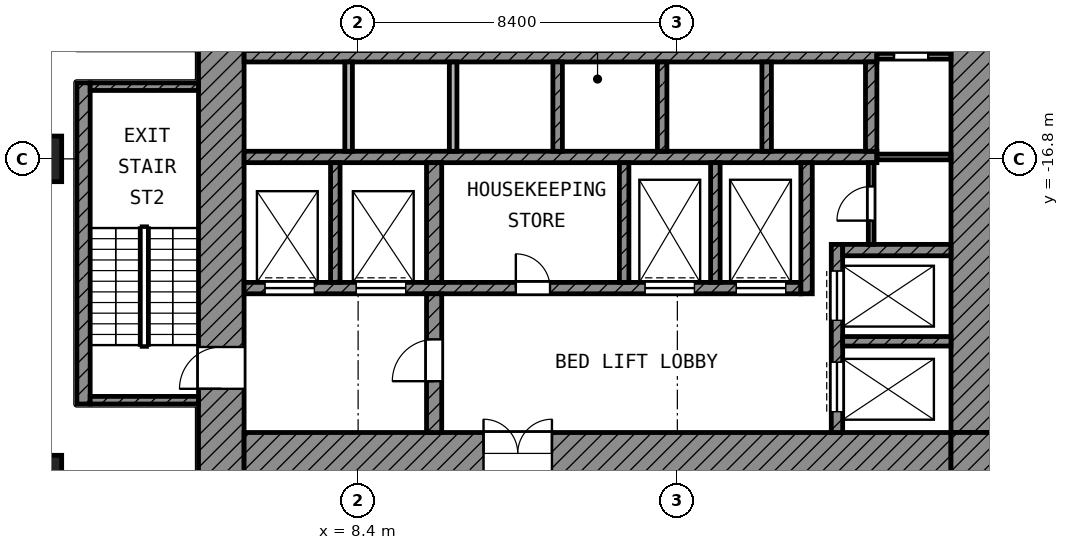
"""IFC4 building model, lengths in metres.
Left out: names, types, materials, properties, quantities, classifications, styles, units other than length and angle.
Written with IfcOpenShell. Run it as: python <this file> out.ifc"""

import sys

from ifc_helpers import new_model, si_unit, direction, frame, frame_2d, origin, origin_2d, place, context, subcontext, project, spatial, rectangle, extrude, element, fill, save


model = new_model("IFC4")
c1 = context("Model", 3, precision=1e-05, world=origin(), true_north=direction((0.0, 1.0)))
c2 = subcontext(c1, "Body", "Model", "MODEL_VIEW")
j1 = project(units=[si_unit("LENGTHUNIT", "METRE"), si_unit("PLANEANGLEUNIT", "RADIAN")], contexts=[c1])
p1 = place(None, origin())
s1 = spatial("IfcSite", under=j1, at=p1, CompositionType="ELEMENT")
p2 = place(p1, origin())
s2 = spatial("IfcBuilding", under=s1, at=p2, CompositionType="ELEMENT")
p3 = place(p2, frame((0.0, 0.0, 56.0)))
s3 = spatial("IfcBuildingStorey", under=s2, at=p3, CompositionType="ELEMENT", Elevation=56.0)
for number, where, z_axis, x_axis in (
    (1, (0.0, -16.8, 0.0), (0.0, 0.0, 1.0), (1.0, 0.0, 0.0)),
    (2, (0.0, -25.2, 0.0), (0.0, 0.0, 1.0), (1.0, 0.0, 0.0)),
):
    element("IfcColumn", number, at=place(p3, frame(where, z_axis=z_axis, x_axis=x_axis)), inside=s3, PredefinedType="COLUMN", context=c2, shape_type="SweptSolid", body=[
        extrude(rectangle(XDim=1.2, YDim=1.2, at=origin_2d()), origin(), (0.0, 0.0, 1.0), 4.2),
    ])
p4 = place(p3, frame((4.8, -25.1, 0.0), z_axis=(0.0, 0.0, 1.0), x_axis=(0.0, 1.0, 0.0)))
e3 = element("IfcWall", 3, at=p4, inside=s3, PredefinedType="SHEAR", context=c2, shape_type="SweptSolid", body=[
    extrude(rectangle(XDim=19.7, YDim=1.2, at=frame_2d((9.85, 0.0))), origin(), (0.0, 0.0, 1.0), 3.9),
])
p5 = place(p4, frame((11.55, 0.0, 0.0)))
e4 = element("IfcOpeningElement", 4, at=p5, cuts=e3, PredefinedType="OPENING", context=c2, shape_type="SweptSolid", body=[
    extrude(rectangle(XDim=1.1, YDim=2.1, at=frame_2d((0.55, 1.05))), frame((0.0, 0.61, 0.0), z_axis=(0.0, -1.0, 0.0), x_axis=(1.0, 0.0, 0.0)), (0.0, 0.0, 1.0), 1.22),
])
p6 = place(p4, frame((2.25, 0.0, 0.0)))
e5 = element("IfcOpeningElement", 5, at=p6, cuts=e3, PredefinedType="OPENING", context=c2, shape_type="SweptSolid", body=[
    extrude(rectangle(XDim=1.1, YDim=2.1, at=frame_2d((0.55, 1.05))), frame((0.0, 0.61, 0.0), z_axis=(0.0, -1.0, 0.0), x_axis=(1.0, 0.0, 0.0)), (0.0, 0.0, 1.0), 1.22),
])
p7 = place(p3, frame((24.55, -24.0, 0.0), z_axis=(0.0, 0.0, 1.0), x_axis=(0.0, 1.0, 0.0)))
e6 = element("IfcWall", 6, at=p7, inside=s3, PredefinedType="SHEAR", context=c2, shape_type="SweptSolid", body=[
    extrude(rectangle(XDim=18.6, YDim=1.1, at=frame_2d((9.3, 0.0))), origin(), (0.0, 0.0, 1.0), 3.9),
])
p8 = place(p7, frame((10.5, 0.0, 0.0)))
e7 = element("IfcOpeningElement", 7, at=p8, cuts=e6, PredefinedType="OPENING", context=c2, shape_type="SweptSolid", body=[
    extrude(rectangle(XDim=1.8, YDim=2.1, at=frame_2d((0.9, 1.05))), frame((0.0, 0.56, 0.0), z_axis=(0.0, -1.0, 0.0), x_axis=(1.0, 0.0, 0.0)), (0.0, 0.0, 1.0), 1.12),
])
p9 = place(p3, frame((5.4, -24.55, 0.0), z_axis=(0.0, 0.0, 1.0), x_axis=(1.0, 0.0, 0.0)))
e8 = element("IfcWall", 8, at=p9, inside=s3, PredefinedType="SHEAR", context=c2, shape_type="SweptSolid", body=[
    extrude(rectangle(XDim=18.6, YDim=1.1, at=frame_2d((9.3, 0.0))), origin(), (0.0, 0.0, 1.0), 3.9),
])
p10 = place(p9, frame((6.3, 0.0, 0.0)))
e9 = element("IfcOpeningElement", 9, at=p10, cuts=e8, PredefinedType="OPENING", context=c2, shape_type="SweptSolid", body=[
    extrude(rectangle(XDim=1.8, YDim=2.1, at=frame_2d((0.9, 1.05))), frame((0.0, 0.56, 0.0), z_axis=(0.0, -1.0, 0.0), x_axis=(1.0, 0.0, 0.0)), (0.0, 0.0, 1.0), 1.12),
])
p11 = place(p3, frame((24.55, -25.1, 0.0), z_axis=(0.0, 0.0, 1.0), x_axis=(0.0, 1.0, 0.0)))
e10 = element("IfcWall", 10, at=p11, inside=s3, PredefinedType="SHEAR", context=c2, shape_type="SweptSolid", body=[
    extrude(rectangle(XDim=1.1, YDim=1.1, at=frame_2d((0.55, 0.0))), origin(), (0.0, 0.0, 1.0), 3.9),
])
for number, where, z_axis, x_axis in (
    (11, (5.4, -14.1, 0.0), (0.0, 0.0, 1.0), (1.0, 0.0, 0.0)),
    (12, (5.4, -16.75, 0.0), (0.0, 0.0, 1.0), (1.0, 0.0, 0.0)),
):
    element("IfcWall", number, at=place(p3, frame(where, z_axis=z_axis, x_axis=x_axis)), inside=s3, PredefinedType="SHEAR", context=c2, shape_type="SweptSolid", body=[
        extrude(rectangle(XDim=16.65, YDim=0.3, at=frame_2d((8.325, 0.0))), origin(), (0.0, 0.0, 1.0), 3.9),
    ])
p12 = place(p3, frame((5.4, -20.2, 0.0), z_axis=(0.0, 0.0, 1.0), x_axis=(1.0, 0.0, 0.0)))
e13 = element("IfcWall", 13, at=p12, inside=s3, PredefinedType="SHEAR", context=c2, shape_type="SweptSolid", body=[
    extrude(rectangle(XDim=14.65, YDim=0.3, at=frame_2d((7.325, 0.0))), origin(), (0.0, 0.0, 1.0), 3.9),
])
p13 = place(p12, frame((10.55, 0.0, 0.0)))
e14 = element("IfcOpeningElement", 14, at=p13, cuts=e13, PredefinedType="OPENING", context=c2, shape_type="SweptSolid", body=[
    extrude(rectangle(XDim=1.3, YDim=2.1, at=frame_2d((0.65, 1.05))), frame((0.0, 0.16, 0.0), z_axis=(0.0, -1.0, 0.0), x_axis=(1.0, 0.0, 0.0)), (0.0, 0.0, 1.0), 0.32),
])
p14 = place(p12, frame((12.95, 0.0, 0.0)))
e15 = element("IfcOpeningElement", 15, at=p14, cuts=e13, PredefinedType="OPENING", context=c2, shape_type="SweptSolid", body=[
    extrude(rectangle(XDim=1.3, YDim=2.1, at=frame_2d((0.65, 1.05))), frame((0.0, 0.16, 0.0), z_axis=(0.0, -1.0, 0.0), x_axis=(1.0, 0.0, 0.0)), (0.0, 0.0, 1.0), 0.32),
])
p15 = place(p12, frame((0.55, 0.0, 0.0)))
e16 = element("IfcOpeningElement", 16, at=p15, cuts=e13, PredefinedType="OPENING", context=c2, shape_type="SweptSolid", body=[
    extrude(rectangle(XDim=1.3, YDim=2.1, at=frame_2d((0.65, 1.05))), frame((0.0, 0.16, 0.0), z_axis=(0.0, -1.0, 0.0), x_axis=(1.0, 0.0, 0.0)), (0.0, 0.0, 1.0), 0.32),
])
p16 = place(p12, frame((2.95, 0.0, 0.0)))
e17 = element("IfcOpeningElement", 17, at=p16, cuts=e13, PredefinedType="OPENING", context=c2, shape_type="SweptSolid", body=[
    extrude(rectangle(XDim=1.3, YDim=2.1, at=frame_2d((0.65, 1.05))), frame((0.0, 0.16, 0.0), z_axis=(0.0, -1.0, 0.0), x_axis=(1.0, 0.0, 0.0)), (0.0, 0.0, 1.0), 0.32),
])
p17 = place(p12, frame((7.15, 0.0, 0.0)))
e18 = element("IfcOpeningElement", 18, at=p17, cuts=e13, PredefinedType="OPENING", context=c2, shape_type="SweptSolid", body=[
    extrude(rectangle(XDim=0.9, YDim=2.1, at=frame_2d((0.45, 1.05))), frame((0.0, 0.16, 0.0), z_axis=(0.0, -1.0, 0.0), x_axis=(1.0, 0.0, 0.0)), (0.0, 0.0, 1.0), 0.32),
])
p18 = place(p3, frame((10.4, -24.0, 0.0), z_axis=(0.0, 0.0, 1.0), x_axis=(0.0, 1.0, 0.0)))
e19 = element("IfcWall", 19, at=p18, inside=s3, PredefinedType="SHEAR", context=c2, shape_type="SweptSolid", body=[
    extrude(rectangle(XDim=3.65, YDim=0.4, at=frame_2d((1.825, 0.0))), origin(), (0.0, 0.0, 1.0), 3.9),
])
p19 = place(p18, frame((1.35, 0.0, 0.0)))
e20 = element("IfcOpeningElement", 20, at=p19, cuts=e19, PredefinedType="OPENING", context=c2, shape_type="SweptSolid", body=[
    extrude(rectangle(XDim=1.1, YDim=2.1, at=frame_2d((0.55, 1.05))), frame((0.0, 0.21, 0.0), z_axis=(0.0, -1.0, 0.0), x_axis=(1.0, 0.0, 0.0)), (0.0, 0.0, 1.0), 0.42),
])
p20 = place(p3, frame((10.4, -20.05, 0.0), z_axis=(0.0, 0.0, 1.0), x_axis=(0.0, 1.0, 0.0)))
e21 = element("IfcWall", 21, at=p20, inside=s3, PredefinedType="SHEAR", context=c2, shape_type="SweptSolid", body=[
    extrude(rectangle(XDim=3.15, YDim=0.4, at=frame_2d((1.575, 0.0))), origin(), (0.0, 0.0, 1.0), 3.9),
])
p21 = place(p3, frame((20.2, -20.35, 0.0), z_axis=(0.0, 0.0, 1.0), x_axis=(0.0, 1.0, 0.0)))
e22 = element("IfcWall", 22, at=p21, inside=s3, PredefinedType="SHEAR", context=c2, shape_type="SweptSolid", body=[
    extrude(rectangle(XDim=3.45, YDim=0.3, at=frame_2d((1.725, 0.0))), origin(), (0.0, 0.0, 1.0), 3.9),
])
p22 = place(p3, frame((21.9, -16.6, 0.0), z_axis=(0.0, 0.0, 1.0), x_axis=(0.0, 1.0, 0.0)))
e23 = element("IfcWall", 23, at=p22, inside=s3, PredefinedType="SHEAR", context=c2, shape_type="SweptSolid", body=[
    extrude(rectangle(XDim=2.35, YDim=0.3, at=frame_2d((1.175, 0.0))), origin(), (0.0, 0.0, 1.0), 3.9),
])
p23 = place(p3, frame((21.15, -19.2, 0.0), z_axis=(0.0, 0.0, 1.0), x_axis=(1.0, 0.0, 0.0)))
e24 = element("IfcWall", 24, at=p23, inside=s3, PredefinedType="SHEAR", context=c2, shape_type="SweptSolid", body=[
    extrude(rectangle(XDim=2.85, YDim=0.3, at=frame_2d((1.425, 0.0))), origin(), (0.0, 0.0, 1.0), 3.9),
])
p24 = place(p3, frame((21.0, -24.0, 0.0), z_axis=(0.0, 0.0, 1.0), x_axis=(0.0, 1.0, 0.0)))
e25 = element("IfcWall", 25, at=p24, inside=s3, PredefinedType="SHEAR", context=c2, shape_type="SweptSolid", body=[
    extrude(rectangle(XDim=4.95, YDim=0.3, at=frame_2d((2.475, 0.0))), origin(), (0.0, 0.0, 1.0), 3.9),
])
p25 = place(p24, frame((2.95, 0.0, 0.0)))
e26 = element("IfcOpeningElement", 26, at=p25, cuts=e25, PredefinedType="OPENING", context=c2, shape_type="SweptSolid", body=[
    extrude(rectangle(XDim=1.3, YDim=2.1, at=frame_2d((0.65, 1.05))), frame((0.0, 0.16, 0.0), z_axis=(0.0, -1.0, 0.0), x_axis=(1.0, 0.0, 0.0)), (0.0, 0.0, 1.0), 0.32),
])
p26 = place(p24, frame((0.55, 0.0, 0.0)))
e27 = element("IfcOpeningElement", 27, at=p26, cuts=e25, PredefinedType="OPENING", context=c2, shape_type="SweptSolid", body=[
    extrude(rectangle(XDim=1.3, YDim=2.1, at=frame_2d((0.65, 1.05))), frame((0.0, 0.16, 0.0), z_axis=(0.0, -1.0, 0.0), x_axis=(1.0, 0.0, 0.0)), (0.0, 0.0, 1.0), 0.32),
])
p27 = place(p3, frame((21.15, -21.6, 0.0), z_axis=(0.0, 0.0, 1.0), x_axis=(1.0, 0.0, 0.0)))
e28 = element("IfcWall", 28, at=p27, inside=s3, PredefinedType="SHEAR", context=c2, shape_type="SweptSolid", body=[
    extrude(rectangle(XDim=2.85, YDim=0.25, at=frame_2d((1.425, 0.0))), origin(), (0.0, 0.0, 1.0), 3.9),
])
for number, where, z_axis, x_axis in (
    (29, (7.8, -20.05, 0.0), (0.0, 0.0, 1.0), (0.0, 1.0, 0.0)),
    (30, (15.4, -20.05, 0.0), (0.0, 0.0, 1.0), (0.0, 1.0, 0.0)),
    (31, (17.8, -20.05, 0.0), (0.0, 0.0, 1.0), (0.0, 1.0, 0.0)),
):
    element("IfcWall", number, at=place(p3, frame(where, z_axis=z_axis, x_axis=x_axis)), inside=s3, PredefinedType="SHEAR", context=c2, shape_type="SweptSolid", body=[
        extrude(rectangle(XDim=3.15, YDim=0.25, at=frame_2d((1.575, 0.0))), origin(), (0.0, 0.0, 1.0), 3.9),
    ])
for number, where, z_axis, x_axis in (
    (32, (8.15, -16.6, 0.0), (0.0, 0.0, 1.0), (0.0, 1.0, 0.0)),
    (33, (10.9, -16.6, 0.0), (0.0, 0.0, 1.0), (0.0, 1.0, 0.0)),
):
    element("IfcWall", number, at=place(p3, frame(where, z_axis=z_axis, x_axis=x_axis)), inside=s3, PredefinedType="PARTITIONING", context=c2, shape_type="SweptSolid", body=[
        extrude(rectangle(XDim=2.35, YDim=0.2, at=frame_2d((1.175, 0.0))), origin(), (0.0, 0.0, 1.0), 3.9),
    ])
for number, where, z_axis, x_axis in (
    (34, (13.65, -16.6, 0.0), (0.0, 0.0, 1.0), (0.0, 1.0, 0.0)),
    (35, (16.4, -16.6, 0.0), (0.0, 0.0, 1.0), (0.0, 1.0, 0.0)),
    (36, (19.15, -16.6, 0.0), (0.0, 0.0, 1.0), (0.0, 1.0, 0.0)),
):
    element("IfcWall", number, at=place(p3, frame(where, z_axis=z_axis, x_axis=x_axis)), inside=s3, PredefinedType="SHEAR", context=c2, shape_type="SweptSolid", body=[
        extrude(rectangle(XDim=2.35, YDim=0.25, at=frame_2d((1.175, 0.0))), origin(), (0.0, 0.0, 1.0), 3.9),
    ])
p28 = place(p3, frame((21.9, -19.05, 0.0), z_axis=(0.0, 0.0, 1.0), x_axis=(0.0, 1.0, 0.0)))
e37 = element("IfcWall", 37, at=p28, inside=s3, PredefinedType="PARTITIONING", context=c2, shape_type="SweptSolid", body=[
    extrude(rectangle(XDim=2.15, YDim=0.15, at=frame_2d((1.075, 0.0))), origin(), (0.0, 0.0, 1.0), 3.9),
])
p29 = place(p28, frame((0.625, 0.0, 0.0)))
e38 = element("IfcOpeningElement", 38, at=p29, cuts=e37, PredefinedType="OPENING", context=c2, shape_type="SweptSolid", body=[
    extrude(rectangle(XDim=0.9, YDim=2.1, at=frame_2d((0.45, 1.05))), frame((0.0, 0.085, 0.0), z_axis=(0.0, -1.0, 0.0), x_axis=(1.0, 0.0, 0.0)), (0.0, 0.0, 1.0), 0.17),
])
p30 = place(p3, frame((22.05, -16.75, 0.0), z_axis=(0.0, 0.0, 1.0), x_axis=(1.0, 0.0, 0.0)))
e39 = element("IfcWall", 39, at=p30, inside=s3, PredefinedType="PARTITIONING", context=c2, shape_type="SweptSolid", body=[
    extrude(rectangle(XDim=1.95, YDim=0.15, at=frame_2d((0.975, 0.0))), origin(), (0.0, 0.0, 1.0), 3.9),
])
p31 = place(p3, frame((22.05, -14.1, 0.0), z_axis=(0.0, 0.0, 1.0), x_axis=(1.0, 0.0, 0.0)))
e40 = element("IfcWall", 40, at=p31, inside=s3, PredefinedType="PARTITIONING", context=c2, shape_type="SweptSolid", body=[
    extrude(rectangle(XDim=1.95, YDim=0.15, at=frame_2d((0.975, 0.0))), origin(), (0.0, 0.0, 1.0), 3.9),
])
p32 = place(p31, frame((0.45, 0.0, 0.0)))
e41 = element("IfcOpeningElement", 41, at=p32, cuts=e40, PredefinedType="OPENING", context=c2, shape_type="SweptSolid", body=[
    extrude(rectangle(XDim=0.9, YDim=2.1, at=frame_2d((0.45, 1.05))), frame((0.0, 0.085, 0.0), z_axis=(0.0, -1.0, 0.0), x_axis=(1.0, 0.0, 0.0)), (0.0, 0.0, 1.0), 0.17),
])
p33 = place(p3, frame((1.175, -23.25, 0.0), z_axis=(0.0, 0.0, 1.0), x_axis=(0.0, 1.0, 0.0)))
e42 = element("IfcWall", 42, at=p33, inside=s3, PredefinedType="SHEAR", context=c2, shape_type="SweptSolid", body=[
    extrude(rectangle(XDim=8.45, YDim=0.35, at=frame_2d((4.225, 0.0))), origin(), (0.0, 0.0, 1.0), 3.9),
])
for number, where, z_axis, x_axis in (
    (43, (1.35, -14.9, 0.0), (0.0, 0.0, 1.0), (1.0, 0.0, 0.0)),
    (44, (1.35, -23.15, 0.0), (0.0, 0.0, 1.0), (1.0, 0.0, 0.0)),
):
    element("IfcWall", number, at=place(p3, frame(where, z_axis=z_axis, x_axis=x_axis)), inside=s3, PredefinedType="SHEAR", context=c2, shape_type="SweptSolid", body=[
        extrude(rectangle(XDim=2.85, YDim=0.2, at=frame_2d((1.425, 0.0))), origin(), (0.0, 0.0, 1.0), 3.9),
    ])
p34 = place(p25, origin())
e45 = element("IfcDoor", 45, at=p34, inside=s3, OperationType="DOUBLE_DOOR_SLIDING", PredefinedType="DOOR", context=c2, shape_type="SweptSolid", body=[
    extrude(rectangle(XDim=1.3, YDim=2.1, at=frame_2d((0.65, 1.05))), frame((0.0, 0.025, 0.0), z_axis=(0.0, -1.0, 0.0), x_axis=(1.0, 0.0, 0.0)), (0.0, 0.0, 1.0), 0.05),
])
fill(e26, e45)
p35 = place(p26, origin())
e46 = element("IfcDoor", 46, at=p35, inside=s3, OperationType="DOUBLE_DOOR_SLIDING", PredefinedType="DOOR", context=c2, shape_type="SweptSolid", body=[
    extrude(rectangle(XDim=1.3, YDim=2.1, at=frame_2d((0.65, 1.05))), frame((0.0, 0.025, 0.0), z_axis=(0.0, -1.0, 0.0), x_axis=(1.0, 0.0, 0.0)), (0.0, 0.0, 1.0), 0.05),
])
fill(e27, e46)
p36 = place(p13, origin())
e47 = element("IfcDoor", 47, at=p36, inside=s3, OperationType="DOUBLE_DOOR_SLIDING", PredefinedType="DOOR", context=c2, shape_type="SweptSolid", body=[
    extrude(rectangle(XDim=1.3, YDim=2.1, at=frame_2d((0.65, 1.05))), frame((0.0, 0.025, 0.0), z_axis=(0.0, -1.0, 0.0), x_axis=(1.0, 0.0, 0.0)), (0.0, 0.0, 1.0), 0.05),
])
fill(e14, e47)
p37 = place(p14, origin())
e48 = element("IfcDoor", 48, at=p37, inside=s3, OperationType="DOUBLE_DOOR_SLIDING", PredefinedType="DOOR", context=c2, shape_type="SweptSolid", body=[
    extrude(rectangle(XDim=1.3, YDim=2.1, at=frame_2d((0.65, 1.05))), frame((0.0, 0.025, 0.0), z_axis=(0.0, -1.0, 0.0), x_axis=(1.0, 0.0, 0.0)), (0.0, 0.0, 1.0), 0.05),
])
fill(e15, e48)
p38 = place(p15, origin())
e49 = element("IfcDoor", 49, at=p38, inside=s3, OperationType="DOUBLE_DOOR_SLIDING", PredefinedType="DOOR", context=c2, shape_type="SweptSolid", body=[
    extrude(rectangle(XDim=1.3, YDim=2.1, at=frame_2d((0.65, 1.05))), frame((0.0, 0.025, 0.0), z_axis=(0.0, -1.0, 0.0), x_axis=(1.0, 0.0, 0.0)), (0.0, 0.0, 1.0), 0.05),
])
fill(e16, e49)
p39 = place(p16, origin())
e50 = element("IfcDoor", 50, at=p39, inside=s3, OperationType="DOUBLE_DOOR_SLIDING", PredefinedType="DOOR", context=c2, shape_type="SweptSolid", body=[
    extrude(rectangle(XDim=1.3, YDim=2.1, at=frame_2d((0.65, 1.05))), frame((0.0, 0.025, 0.0), z_axis=(0.0, -1.0, 0.0), x_axis=(1.0, 0.0, 0.0)), (0.0, 0.0, 1.0), 0.05),
])
fill(e17, e50)
p40 = place(p6, origin())
e51 = element("IfcDoor", 51, at=p40, inside=s3, OperationType="SINGLE_SWING_LEFT", PredefinedType="DOOR", context=c2, shape_type="SweptSolid", body=[
    extrude(rectangle(XDim=1.1, YDim=2.1, at=frame_2d((0.55, 1.05))), frame((0.0, 0.025, 0.0), z_axis=(0.0, -1.0, 0.0), x_axis=(1.0, 0.0, 0.0)), (0.0, 0.0, 1.0), 0.05),
])
fill(e5, e51)
p41 = place(p19, origin())
e52 = element("IfcDoor", 52, at=p41, inside=s3, OperationType="SINGLE_SWING_LEFT", PredefinedType="DOOR", context=c2, shape_type="SweptSolid", body=[
    extrude(rectangle(XDim=1.1, YDim=2.1, at=frame_2d((0.55, 1.05))), frame((0.0, 0.025, 0.0), z_axis=(0.0, -1.0, 0.0), x_axis=(1.0, 0.0, 0.0)), (0.0, 0.0, 1.0), 0.05),
])
fill(e20, e52)
p42 = place(p10, origin())
e53 = element("IfcDoor", 53, at=p42, inside=s3, OperationType="DOUBLE_DOOR_SINGLE_SWING", PredefinedType="DOOR", context=c2, shape_type="SweptSolid", body=[
    extrude(rectangle(XDim=1.8, YDim=2.1, at=frame_2d((0.9, 1.05))), frame((0.0, 0.025, 0.0), z_axis=(0.0, -1.0, 0.0), x_axis=(1.0, 0.0, 0.0)), (0.0, 0.0, 1.0), 0.05),
])
fill(e9, e53)
p43 = place(p32, origin())
e54 = element("IfcDoor", 54, at=p43, inside=s3, OperationType="SINGLE_SWING_LEFT", PredefinedType="DOOR", context=c2, shape_type="SweptSolid", body=[
    extrude(rectangle(XDim=0.9, YDim=2.1, at=frame_2d((0.45, 1.05))), frame((0.0, 0.025, 0.0), z_axis=(0.0, -1.0, 0.0), x_axis=(1.0, 0.0, 0.0)), (0.0, 0.0, 1.0), 0.05),
])
fill(e41, e54)
p44 = place(p29, origin())
e55 = element("IfcDoor", 55, at=p44, inside=s3, OperationType="SINGLE_SWING_LEFT", PredefinedType="DOOR", context=c2, shape_type="SweptSolid", body=[
    extrude(rectangle(XDim=0.9, YDim=2.1, at=frame_2d((0.45, 1.05))), frame((0.0, 0.025, 0.0), z_axis=(0.0, -1.0, 0.0), x_axis=(1.0, 0.0, 0.0)), (0.0, 0.0, 1.0), 0.05),
])
fill(e38, e55)
p45 = place(p17, origin())
e56 = element("IfcDoor", 56, at=p45, inside=s3, OperationType="SINGLE_SWING_LEFT", PredefinedType="DOOR", context=c2, shape_type="SweptSolid", body=[
    extrude(rectangle(XDim=0.9, YDim=2.1, at=frame_2d((0.45, 1.05))), frame((0.0, 0.025, 0.0), z_axis=(0.0, -1.0, 0.0), x_axis=(1.0, 0.0, 0.0)), (0.0, 0.0, 1.0), 0.05),
])
fill(e18, e56)
save(model, sys.argv[1])
